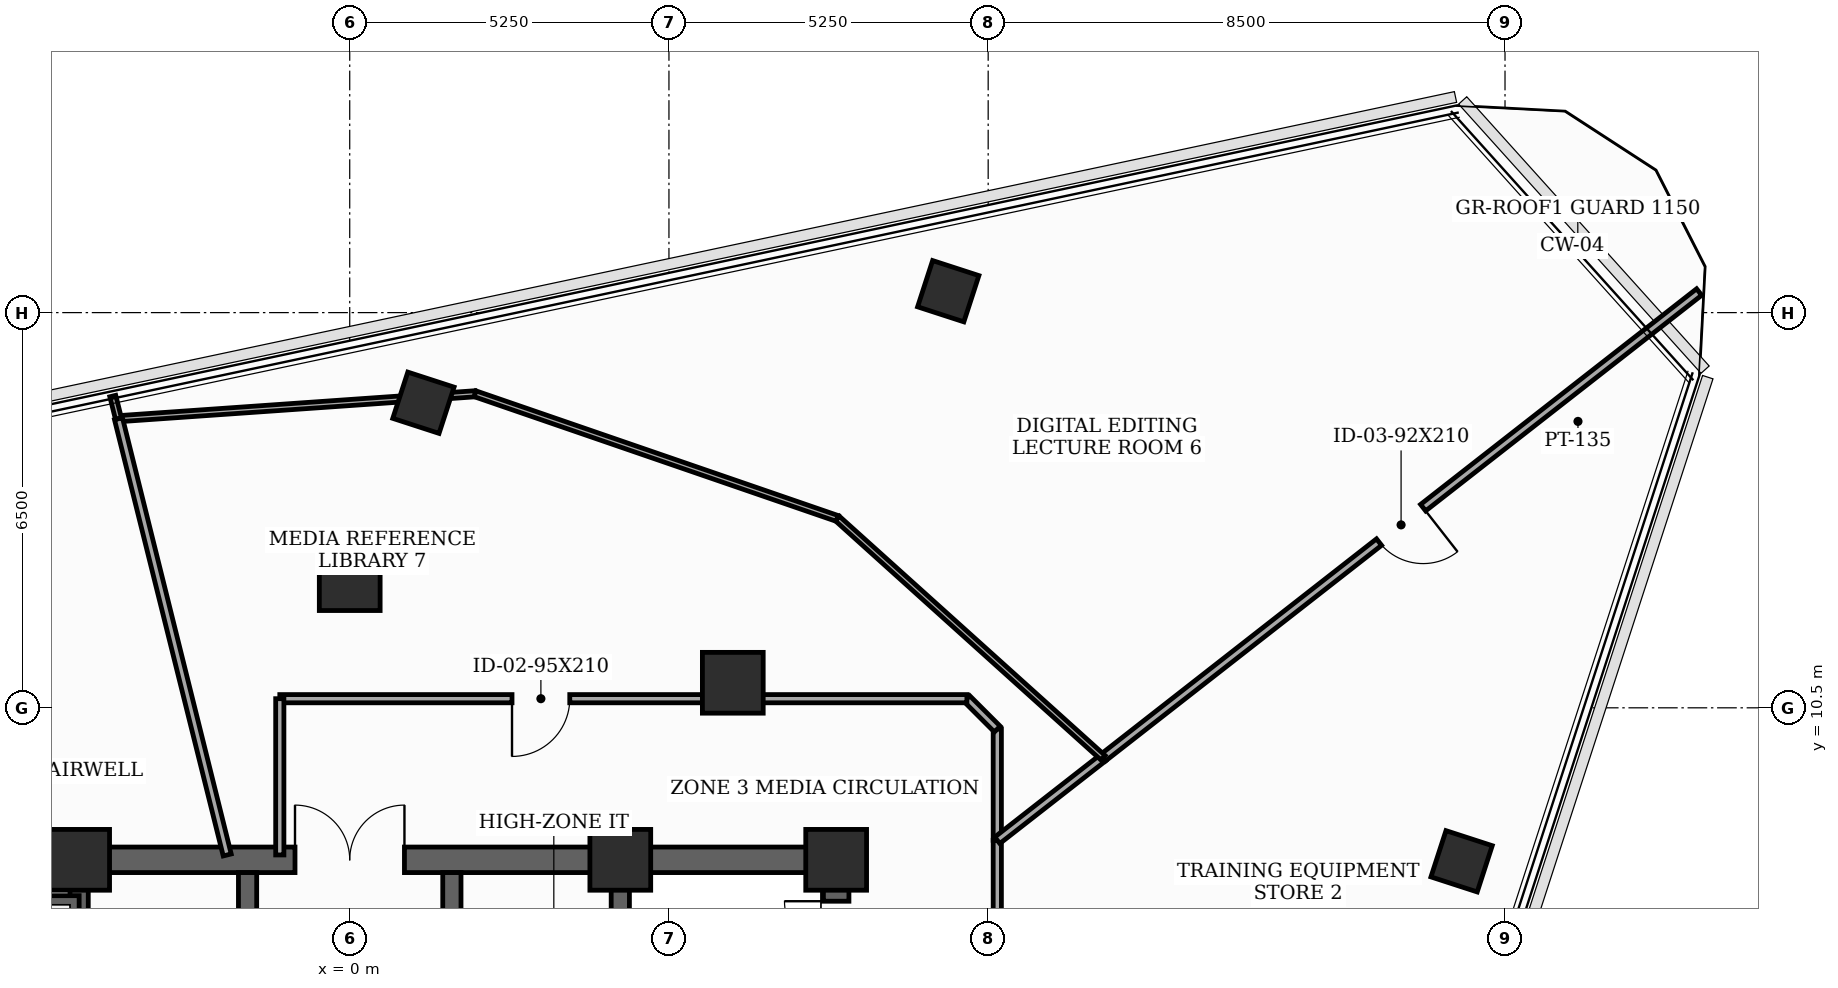
"""IFC4 building model, lengths in metres.
Left out: names, types, materials, properties, quantities, classifications, styles, units other than length and angle.
Written with IfcOpenShell. Run it as: python <this file> out.ifc"""

import sys

from ifc_helpers import new_model, si_unit, direction, frame, frame_2d, origin, origin_2d, place, context, subcontext, project, spatial, rectangle, extrude, element, fill, save


model = new_model("IFC4")
c1 = context("Model", 3, precision=1e-05, world=origin(), true_north=direction((0.0, 1.0)))
c2 = subcontext(c1, "Body", "Model", "MODEL_VIEW")
j1 = project(units=[si_unit("LENGTHUNIT", "METRE"), si_unit("PLANEANGLEUNIT", "RADIAN")], contexts=[c1])
p1 = place(None, origin())
s1 = spatial("IfcSite", under=j1, at=p1, CompositionType="ELEMENT")
p2 = place(p1, origin())
s2 = spatial("IfcBuilding", under=s1, at=p2, CompositionType="ELEMENT")
p3 = place(p2, frame((0.0, 0.0, 283.2)))
s3 = spatial("IfcBuildingStorey", under=s2, at=p3, CompositionType="ELEMENT", Elevation=283.2)
for number, where, z_axis, x_axis in (
    (1, (8.0, 8.0, 0.0), (0.0, 0.0, 1.0), (1.0, 0.0, 0.0)),
    (2, (4.45, 8.0, 0.0), (0.0, 0.0, 1.0), (1.0, 0.0, 0.0)),
    (3, (-4.45, 8.0, 0.0), (0.0, 0.0, 1.0), (1.0, 0.0, 0.0)),
    (4, (6.3, 10.912, 0.0), (0.0, 0.0, 1.0), (1.0, 0.0, 0.0)),
    (5, (0.0, 12.6, 0.0), (0.0, 0.0, 1.0), (1.0, 0.0, 0.0)),
):
    element("IfcColumn", number, at=place(p3, frame(where, z_axis=z_axis, x_axis=x_axis)), inside=s3, PredefinedType="COLUMN", context=c2, shape_type="SweptSolid", body=[
        extrude(rectangle(XDim=1.0, YDim=1.0, at=origin_2d()), origin(), (0.0, 0.0, 1.0), 3.7),
    ])
for number, where, z_axis, x_axis in (
    (6, (18.286, 7.976, 0.0), (0.0, 0.0, 1.0), (0.309, 0.951, 0.0)),
    (7, (9.844, 17.352, 0.0), (0.0, 0.0, 1.0), (0.309, 0.951, 0.0)),
    (8, (1.212, 15.518, 0.0), (0.0, 0.0, 1.0), (0.309, 0.951, 0.0)),
):
    element("IfcColumn", number, at=place(p3, frame(where, z_axis=z_axis, x_axis=x_axis)), inside=s3, PredefinedType="COLUMN", context=c2, shape_type="SweptSolid", body=[
        extrude(rectangle(XDim=0.8, YDim=0.8, at=origin_2d()), origin(), (0.0, 0.0, 1.0), 3.7),
    ])
p4 = place(p3, frame((8.0, -8.0, 0.0), z_axis=(0.0, 0.0, 1.0), x_axis=(0.0, 1.0, 0.0)))
e9 = element("IfcWall", 9, at=p4, inside=s3, PredefinedType="SHEAR", context=c2, shape_type="SweptSolid", body=[
    extrude(rectangle(XDim=16.0, YDim=0.42, at=frame_2d((8.0, 0.0))), origin(), (0.0, 0.0, 1.0), 3.5),
])
p5 = place(p4, frame((9.6, 0.0, 0.0)))
e10 = element("IfcOpeningElement", 10, at=p5, cuts=e9, PredefinedType="OPENING", context=c2, shape_type="SweptSolid", body=[
    extrude(rectangle(XDim=1.05, YDim=2.15, at=frame_2d((0.525, 1.075))), frame((0.0, 0.22, 0.0), z_axis=(0.0, -1.0, 0.0), x_axis=(1.0, 0.0, 0.0)), (0.0, 0.0, 1.0), 0.44),
])
p6 = place(p4, frame((14.469, 0.0, 0.0)))
e11 = element("IfcOpeningElement", 11, at=p6, cuts=e9, PredefinedType="OPENING", context=c2, shape_type="SweptSolid", body=[
    extrude(rectangle(XDim=0.85, YDim=2.02, at=frame_2d((0.425, 1.01))), frame((0.0, 0.22, 0.0), z_axis=(0.0, -1.0, 0.0), x_axis=(1.0, 0.0, 0.0)), (0.0, 0.0, 1.0), 0.44),
])
p7 = place(p3, frame((-8.0, 8.0, 0.0), z_axis=(0.0, 0.0, 1.0), x_axis=(1.0, 0.0, 0.0)))
e12 = element("IfcWall", 12, at=p7, inside=s3, PredefinedType="SHEAR", context=c2, shape_type="SweptSolid", body=[
    extrude(rectangle(XDim=16.0, YDim=0.42, at=frame_2d((8.0, 0.0))), origin(), (0.0, 0.0, 1.0), 3.5),
])
p8 = place(p7, frame((7.1, 0.0, 0.0)))
e13 = element("IfcOpeningElement", 13, at=p8, cuts=e12, PredefinedType="OPENING", context=c2, shape_type="SweptSolid", body=[
    extrude(rectangle(XDim=1.8, YDim=2.15, at=frame_2d((0.9, 1.075))), frame((0.0, 0.22, 0.0), z_axis=(0.0, -1.0, 0.0), x_axis=(1.0, 0.0, 0.0)), (0.0, 0.0, 1.0), 0.44),
])
for number, where, z_axis, x_axis in (
    (14, (-4.45, -7.79, 0.0), (0.0, 0.0, 1.0), (0.0, 1.0, 0.0)),
    (15, (4.45, -7.79, 0.0), (0.0, 0.0, 1.0), (0.0, 1.0, 0.0)),
):
    element("IfcWall", number, at=place(p3, frame(where, z_axis=z_axis, x_axis=x_axis)), inside=s3, PredefinedType="SHEAR", context=c2, shape_type="SweptSolid", body=[
        extrude(rectangle(XDim=15.58, YDim=0.3, at=frame_2d((7.79, 0.0))), origin(), (0.0, 0.0, 1.0), 3.5),
    ])
p9 = place(p3, frame((-7.79, 7.26, 0.0), z_axis=(0.0, 0.0, 1.0), x_axis=(1.0, 0.0, 0.0)))
e16 = element("IfcWall", 16, at=p9, inside=s3, PredefinedType="SHEAR", context=c2, shape_type="SweptSolid", body=[
    extrude(rectangle(XDim=3.34, YDim=0.3, at=frame_2d((1.67, 0.0))), origin(), (0.0, 0.0, 1.0), 3.5),
])
p10 = place(p3, frame((-1.68, -4.85, 0.0), z_axis=(0.0, 0.0, 1.0), x_axis=(0.0, 1.0, 0.0)))
e17 = element("IfcWall", 17, at=p10, inside=s3, PredefinedType="SHEAR", context=c2, shape_type="SweptSolid", body=[
    extrude(rectangle(XDim=12.64, YDim=0.3, at=frame_2d((6.32, 0.0))), origin(), (0.0, 0.0, 1.0), 3.5),
])
p11 = place(p10, frame((2.6, 0.0, 0.0)))
e18 = element("IfcOpeningElement", 18, at=p11, cuts=e17, PredefinedType="OPENING", context=c2, shape_type="SweptSolid", body=[
    extrude(rectangle(XDim=0.95, YDim=2.1, at=frame_2d((0.475, 1.05))), frame((0.0, 0.16, 0.0), z_axis=(0.0, -1.0, 0.0), x_axis=(1.0, 0.0, 0.0)), (0.0, 0.0, 1.0), 0.32),
])
p12 = place(p10, frame((8.8, 0.0, 0.0)))
e19 = element("IfcOpeningElement", 19, at=p12, cuts=e17, PredefinedType="OPENING", context=c2, shape_type="SweptSolid", body=[
    extrude(rectangle(XDim=0.95, YDim=2.1, at=frame_2d((0.475, 1.05))), frame((0.0, 0.16, 0.0), z_axis=(0.0, -1.0, 0.0), x_axis=(1.0, 0.0, 0.0)), (0.0, 0.0, 1.0), 0.32),
])
p13 = place(p3, frame((1.68, -4.85, 0.0), z_axis=(0.0, 0.0, 1.0), x_axis=(0.0, 1.0, 0.0)))
e20 = element("IfcWall", 20, at=p13, inside=s3, PredefinedType="SHEAR", context=c2, shape_type="SweptSolid", body=[
    extrude(rectangle(XDim=12.64, YDim=0.3, at=frame_2d((6.32, 0.0))), origin(), (0.0, 0.0, 1.0), 3.5),
])
p14 = place(p13, frame((0.55, 0.0, 0.0)))
e21 = element("IfcOpeningElement", 21, at=p14, cuts=e20, PredefinedType="OPENING", context=c2, shape_type="SweptSolid", body=[
    extrude(rectangle(XDim=1.1, YDim=2.1, at=frame_2d((0.55, 1.05))), frame((0.0, 0.16, 0.0), z_axis=(0.0, -1.0, 0.0), x_axis=(1.0, 0.0, 0.0)), (0.0, 0.0, 1.0), 0.32),
])
p15 = place(p13, frame((2.65, 0.0, 0.0)))
e22 = element("IfcOpeningElement", 22, at=p15, cuts=e20, PredefinedType="OPENING", context=c2, shape_type="SweptSolid", body=[
    extrude(rectangle(XDim=1.1, YDim=2.1, at=frame_2d((0.55, 1.05))), frame((0.0, 0.16, 0.0), z_axis=(0.0, -1.0, 0.0), x_axis=(1.0, 0.0, 0.0)), (0.0, 0.0, 1.0), 0.32),
])
p16 = place(p13, frame((4.75, 0.0, 0.0)))
e23 = element("IfcOpeningElement", 23, at=p16, cuts=e20, PredefinedType="OPENING", context=c2, shape_type="SweptSolid", body=[
    extrude(rectangle(XDim=1.1, YDim=2.1, at=frame_2d((0.55, 1.05))), frame((0.0, 0.16, 0.0), z_axis=(0.0, -1.0, 0.0), x_axis=(1.0, 0.0, 0.0)), (0.0, 0.0, 1.0), 0.32),
])
p17 = place(p13, frame((6.8, 0.0, 0.0)))
e24 = element("IfcOpeningElement", 24, at=p17, cuts=e20, PredefinedType="OPENING", context=c2, shape_type="SweptSolid", body=[
    extrude(rectangle(XDim=0.92, YDim=2.1, at=frame_2d((0.46, 1.05))), frame((0.0, 0.16, 0.0), z_axis=(0.0, -1.0, 0.0), x_axis=(1.0, 0.0, 0.0)), (0.0, 0.0, 1.0), 0.32),
])
p18 = place(p13, frame((9.8, 0.0, 0.0)))
e25 = element("IfcOpeningElement", 25, at=p18, cuts=e20, PredefinedType="OPENING", context=c2, shape_type="SweptSolid", body=[
    extrude(rectangle(XDim=0.95, YDim=2.1, at=frame_2d((0.475, 1.05))), frame((0.0, 0.16, 0.0), z_axis=(0.0, -1.0, 0.0), x_axis=(1.0, 0.0, 0.0)), (0.0, 0.0, 1.0), 0.32),
])
p19 = place(p3, frame((10.65, 4.225, 0.0), z_axis=(0.0, 0.0, 1.0), x_axis=(0.0, 1.0, 0.0)))
e26 = element("IfcWall", 26, at=p19, inside=s3, PredefinedType="PARTITIONING", context=c2, shape_type="SweptSolid", body=[
    extrude(rectangle(XDim=4.096, YDim=0.135, at=frame_2d((2.048, 0.0))), origin(), (0.0, 0.0, 1.0), 2.885),
])
p20 = place(p3, frame((10.65, 8.321, 0.0), z_axis=(0.0, 0.0, 1.0), x_axis=(0.0, 1.0, 0.0)))
e27 = element("IfcWall", 27, at=p20, inside=s3, PredefinedType="PARTITIONING", context=c2, shape_type="SweptSolid", body=[
    extrude(rectangle(XDim=1.829, YDim=0.135, at=frame_2d((0.915, 0.0))), origin(), (0.0, 0.0, 1.0), 3.5),
])
p21 = place(p3, frame((10.65, 10.15, 0.0), z_axis=(0.0, 0.0, 1.0), x_axis=(-0.707106781187, 0.707106781187, 0.0)))
e28 = element("IfcWall", 28, at=p21, inside=s3, PredefinedType="PARTITIONING", context=c2, shape_type="SweptSolid", body=[
    extrude(rectangle(XDim=0.707, YDim=0.135, at=frame_2d((0.354, 0.0))), origin(), (0.0, 0.0, 1.0), 3.5),
])
p22 = place(p3, frame((10.15, 10.65, 0.0), z_axis=(0.0, 0.0, 1.0), x_axis=(-1.0, 0.0, 0.0)))
e29 = element("IfcWall", 29, at=p22, inside=s3, PredefinedType="PARTITIONING", context=c2, shape_type="SweptSolid", body=[
    extrude(rectangle(XDim=11.3, YDim=0.135, at=frame_2d((5.65, 0.0))), origin(), (0.0, 0.0, 1.0), 2.885),
])
p23 = place(p22, frame((6.531, 0.0, 0.0)))
e30 = element("IfcOpeningElement", 30, at=p23, cuts=e29, PredefinedType="OPENING", context=c2, shape_type="SweptSolid", body=[
    extrude(rectangle(XDim=0.95, YDim=2.1, at=frame_2d((0.475, 1.05))), frame((0.0, 0.077, 0.0), z_axis=(0.0, -1.0, 0.0), x_axis=(1.0, 0.0, 0.0)), (0.0, 0.0, 1.0), 0.155),
])
p24 = place(p3, frame((-1.15, 10.65, 0.0), z_axis=(0.0, 0.0, 1.0), x_axis=(0.0, -1.0, 0.0)))
e31 = element("IfcWall", 31, at=p24, inside=s3, PredefinedType="PARTITIONING", context=c2, shape_type="SweptSolid", body=[
    extrude(rectangle(XDim=2.57, YDim=0.135, at=frame_2d((1.285, 0.0))), origin(), (0.0, 0.0, 1.0), 2.885),
])
p25 = place(p3, frame((22.192, 17.338, 0.0), z_axis=(0.0, 0.0, 1.0), x_axis=(-0.788006224946, -0.615667271703, 0.0)))
e32 = element("IfcWall", 32, at=p25, inside=s3, PredefinedType="PARTITIONING", context=c2, shape_type="SweptSolid", body=[
    extrude(rectangle(XDim=12.441, YDim=0.135, at=frame_2d((6.22, 0.0))), origin(), (0.0, 0.0, 1.0), 3.035),
])
p26 = place(p25, frame((5.76, 0.0, 0.0)))
e33 = element("IfcOpeningElement", 33, at=p26, cuts=e32, PredefinedType="OPENING", context=c2, shape_type="SweptSolid", body=[
    extrude(rectangle(XDim=0.92, YDim=2.1, at=frame_2d((0.46, 1.05))), frame((0.0, 0.077, 0.0), z_axis=(0.0, -1.0, 0.0), x_axis=(1.0, 0.0, 0.0)), (0.0, 0.0, 1.0), 0.155),
])
p27 = place(p3, frame((12.389, 9.679, 0.0), z_axis=(0.0, 0.0, 1.0), x_axis=(-0.788177008199, -0.615448619908, 0.0)))
e34 = element("IfcWall", 34, at=p27, inside=s3, PredefinedType="PARTITIONING", context=c2, shape_type="SweptSolid", body=[
    extrude(rectangle(XDim=2.206, YDim=0.135, at=frame_2d((1.103, 0.0))), origin(), (0.0, 0.0, 1.0), 3.5),
])
p28 = place(p3, frame((-3.803, 15.255, 0.0), z_axis=(0.0, 0.0, 1.0), x_axis=(0.997563622011, 0.069762597718, 0.0)))
e35 = element("IfcWall", 35, at=p28, inside=s3, PredefinedType="MOVABLE", context=c2, shape_type="SweptSolid", body=[
    extrude(rectangle(XDim=5.879, YDim=0.1, at=frame_2d((2.94, 0.0))), origin(), (0.0, 0.0, 1.0), 3.035),
])
p29 = place(p3, frame((2.062, 15.665, 0.0), z_axis=(0.0, 0.0, 1.0), x_axis=(0.94552565825, -0.32554758422, 0.0)))
e36 = element("IfcWall", 36, at=p29, inside=s3, PredefinedType="MOVABLE", context=c2, shape_type="SweptSolid", body=[
    extrude(rectangle(XDim=6.3, YDim=0.1, at=frame_2d((3.15, 0.0))), origin(), (0.0, 0.0, 1.0), 3.035),
])
p30 = place(p3, frame((8.019, 13.614, 0.0), z_axis=(0.0, 0.0, 1.0), x_axis=(0.743110388877, -0.669168850099, 0.0)))
e37 = element("IfcWall", 37, at=p30, inside=s3, PredefinedType="MOVABLE", context=c2, shape_type="SweptSolid", body=[
    extrude(rectangle(XDim=5.881, YDim=0.1, at=frame_2d((2.94, 0.0))), origin(), (0.0, 0.0, 1.0), 3.035),
])
p31 = place(p3, frame((-3.897, 15.628, 0.0), z_axis=(0.0, 0.0, 1.0), x_axis=(0.24388032021, -0.969805335835, 0.0)))
e38 = element("IfcWall", 38, at=p31, inside=s3, PredefinedType="MOVABLE", context=c2, shape_type="SweptSolid", body=[
    extrude(rectangle(XDim=0.385, YDim=0.1, at=frame_2d((0.192, 0.0))), origin(), (0.0, 0.0, 1.0), 3.5),
])
p32 = place(p3, frame((-3.803, 15.255, 0.0), z_axis=(0.0, 0.0, 1.0), x_axis=(0.241851911951, -0.970313172479, 0.0)))
e39 = element("IfcWall", 39, at=p32, inside=s3, PredefinedType="PARTITIONING", context=c2, shape_type="SweptSolid", body=[
    extrude(rectangle(XDim=7.394, YDim=0.135, at=frame_2d((3.697, 0.0))), origin(), (0.0, 0.0, 1.0), 2.885),
])
p33 = place(p6, origin())
e40 = element("IfcDoor", 40, at=p33, inside=s3, OperationType="SINGLE_SWING_RIGHT", PredefinedType="TRAPDOOR", context=c2, shape_type="SweptSolid", body=[
    extrude(rectangle(XDim=0.85, YDim=2.02, at=frame_2d((0.425, 1.01))), frame((0.0, 0.025, 0.0), z_axis=(0.0, -1.0, 0.0), x_axis=(1.0, 0.0, 0.0)), (0.0, 0.0, 1.0), 0.05),
])
fill(e11, e40)
p34 = place(p8, origin())
e41 = element("IfcDoor", 41, at=p34, inside=s3, OperationType="DOUBLE_DOOR_SINGLE_SWING", PredefinedType="DOOR", context=c2, shape_type="SweptSolid", body=[
    extrude(rectangle(XDim=1.8, YDim=2.15, at=frame_2d((0.9, 1.075))), frame((0.0, 0.025, 0.0), z_axis=(0.0, -1.0, 0.0), x_axis=(1.0, 0.0, 0.0)), (0.0, 0.0, 1.0), 0.05),
])
fill(e13, e41)
p35 = place(p23, origin())
e42 = element("IfcDoor", 42, at=p35, inside=s3, OperationType="SINGLE_SWING_RIGHT", PredefinedType="DOOR", context=c2, shape_type="SweptSolid", body=[
    extrude(rectangle(XDim=0.95, YDim=2.1, at=frame_2d((0.475, 1.05))), frame((0.0, 0.025, 0.0), z_axis=(0.0, -1.0, 0.0), x_axis=(1.0, 0.0, 0.0)), (0.0, 0.0, 1.0), 0.05),
])
fill(e30, e42)
p36 = place(p26, origin())
e43 = element("IfcDoor", 43, at=p36, inside=s3, OperationType="SINGLE_SWING_LEFT", PredefinedType="DOOR", context=c2, shape_type="SweptSolid", body=[
    extrude(rectangle(XDim=0.92, YDim=2.1, at=frame_2d((0.46, 1.05))), frame((0.0, 0.025, 0.0), z_axis=(0.0, -1.0, 0.0), x_axis=(1.0, 0.0, 0.0)), (0.0, 0.0, 1.0), 0.05),
])
fill(e33, e43)
save(model, sys.argv[1])
